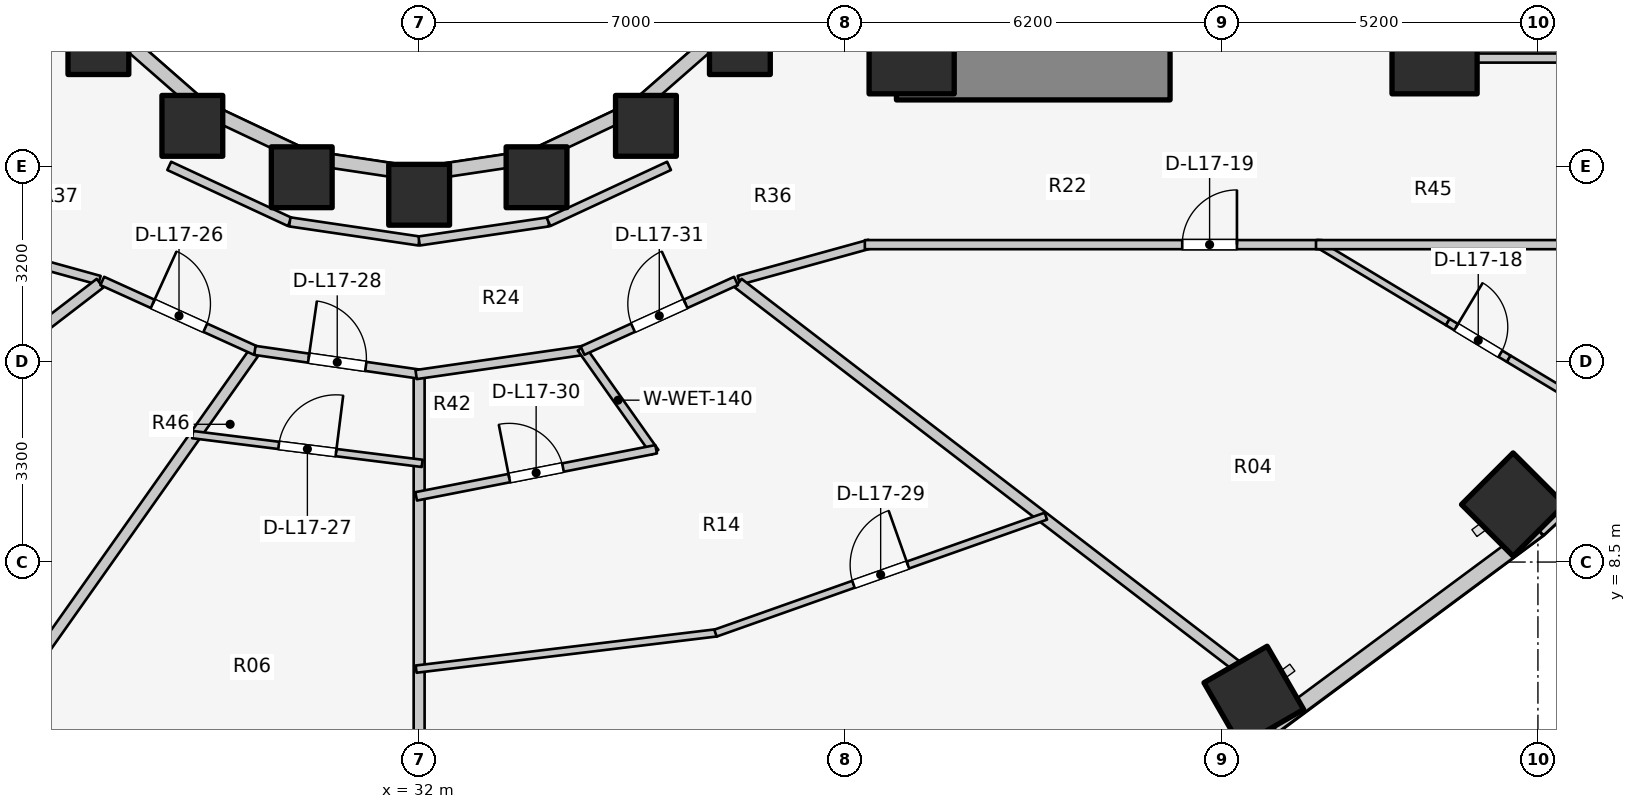
"""IFC4 building model, lengths in metres.
Left out: names, types, materials, properties, quantities, classifications, styles, units other than length and angle.
Written with IfcOpenShell. Run it as: python <this file> out.ifc"""

import sys

from ifc_helpers import new_model, si_unit, direction, frame, frame_2d, origin, origin_2d, place, context, subcontext, project, spatial, rectangle, extrude, element, fill, save


model = new_model("IFC4")
c1 = context("Model", 3, precision=1e-05, world=origin(), true_north=direction((0.0, 1.0)))
c2 = subcontext(c1, "Body", "Model", "MODEL_VIEW")
j1 = project(units=[si_unit("LENGTHUNIT", "METRE"), si_unit("PLANEANGLEUNIT", "RADIAN")], contexts=[c1])
p1 = place(None, origin())
s1 = spatial("IfcSite", under=j1, at=p1, CompositionType="ELEMENT")
p2 = place(p1, origin())
s2 = spatial("IfcBuilding", under=s1, at=p2, CompositionType="ELEMENT")
p3 = place(p2, frame((0.0, 0.0, 58.6)))
s3 = spatial("IfcBuildingStorey", under=s2, at=p3, CompositionType="ELEMENT", Elevation=58.6)
p4 = place(p3, frame((39.85, 16.55, 0.0), z_axis=(0.0, 0.0, 1.0), x_axis=(1.0, 0.0, 0.0)))
e1 = element("IfcWall", 1, at=p4, inside=s3, PredefinedType="SHEAR", context=c2, shape_type="SweptSolid", body=[
    extrude(rectangle(XDim=4.5, YDim=0.9, at=frame_2d((2.25, 0.0))), origin(), (0.0, 0.0, 1.0), 3.1),
])
for number, where, z_axis, x_axis in (
    (2, (40.1, 16.9, 0.0), (0.0, 0.0, 1.0), (1.0, 0.0, 0.0)),
    (3, (48.7, 16.9, 0.0), (0.0, 0.0, 1.0), (1.0, 0.0, 0.0)),
):
    element("IfcColumn", number, at=place(p3, frame(where, z_axis=z_axis, x_axis=x_axis)), inside=s3, PredefinedType="COLUMN", context=c2, shape_type="SweptSolid", body=[
        extrude(rectangle(XDim=1.4, YDim=1.4, at=origin_2d()), origin(), (0.0, 0.0, 1.0), 3.1),
    ])
for number, where, z_axis, x_axis in (
    (4, (26.725, 17.018, 0.0), (0.0, 0.0, 1.0), (1.0, 0.0, 0.0)),
    (5, (28.27, 15.673, 0.0), (0.0, 0.0, 1.0), (1.0, 0.0, 0.0)),
    (6, (30.069, 14.828, 0.0), (0.0, 0.0, 1.0), (1.0, 0.0, 0.0)),
    (7, (32.0, 14.54, 0.0), (0.0, 0.0, 1.0), (1.0, 0.0, 0.0)),
    (8, (33.931, 14.828, 0.0), (0.0, 0.0, 1.0), (1.0, 0.0, 0.0)),
    (9, (35.73, 15.673, 0.0), (0.0, 0.0, 1.0), (1.0, 0.0, 0.0)),
):
    element("IfcColumn", number, at=place(p3, frame(where, z_axis=z_axis, x_axis=x_axis)), inside=s3, PredefinedType="COLUMN", context=c2, shape_type="SweptSolid", body=[
        extrude(rectangle(XDim=1.0, YDim=1.0, at=origin_2d()), origin(), (0.0, 0.0, 1.0), 3.1),
    ])
p5 = place(p3, frame((45.727, 6.296, 0.0), z_axis=(0.0, 0.0, 1.0), x_axis=(0.5, -0.866025403784, 0.0)))
e10 = element("IfcColumn", 10, at=p5, inside=s3, PredefinedType="COLUMN", context=c2, shape_type="SweptSolid", body=[
    extrude(rectangle(XDim=1.2, YDim=1.2, at=origin_2d()), origin(), (0.0, 0.0, 1.0), 3.1),
])
p6 = place(p3, frame((37.275, 17.018, 0.0), z_axis=(0.0, 0.0, 1.0), x_axis=(1.0, 0.0, 0.0)))
e11 = element("IfcColumn", 11, at=p6, inside=s3, PredefinedType="COLUMN", context=c2, shape_type="SweptSolid", body=[
    extrude(rectangle(XDim=1.0, YDim=1.0, at=origin_2d()), origin(), (0.0, 0.0, 1.0), 3.1),
])
p7 = place(p3, frame((49.992, 9.446, 0.0), z_axis=(0.0, 0.0, 1.0), x_axis=(0.707106781187, -0.707106781187, 0.0)))
e12 = element("IfcColumn", 12, at=p7, inside=s3, PredefinedType="COLUMN", context=c2, shape_type="SweptSolid", body=[
    extrude(rectangle(XDim=1.2, YDim=1.2, at=origin_2d()), origin(), (0.0, 0.0, 1.0), 3.1),
])
p8 = place(p3, frame((26.965, 17.258, 0.0), z_axis=(0.0, 0.0, 1.0), x_axis=(0.752576694707, -0.658504607869, 0.0)))
e13 = element("IfcWall", 13, at=p8, inside=s3, PredefinedType="STANDARD", context=c2, shape_type="SweptSolid", body=[
    extrude(rectangle(XDim=1.959, YDim=0.23, at=frame_2d((0.98, 0.0))), origin(), (0.0, 0.0, 1.0), 2.16),
])
p9 = place(p3, frame((28.44, 15.968, 0.0), z_axis=(0.0, 0.0, 1.0), x_axis=(0.904179699603, -0.427152280606, 0.0)))
e14 = element("IfcWall", 14, at=p9, inside=s3, PredefinedType="STANDARD", context=c2, shape_type="SweptSolid", body=[
    extrude(rectangle(XDim=1.899, YDim=0.23, at=frame_2d((0.95, 0.0))), origin(), (0.0, 0.0, 1.0), 2.16),
])
for number, where, z_axis, x_axis in (
    (15, (30.157, 15.157, 0.0), (0.0, 0.0, 1.0), (0.989, -0.149, 0.0)),
    (16, (32.0, 14.88, 0.0), (0.0, 0.0, 1.0), (0.989, 0.149, 0.0)),
):
    element("IfcWall", number, at=place(p3, frame(where, z_axis=z_axis, x_axis=x_axis)), inside=s3, PredefinedType="STANDARD", context=c2, shape_type="SweptSolid", body=[
        extrude(rectangle(XDim=1.864, YDim=0.23, at=frame_2d((0.932, 0.0))), origin(), (0.0, 0.0, 1.0), 2.16),
    ])
p10 = place(p3, frame((33.843, 15.157, 0.0), z_axis=(0.0, 0.0, 1.0), x_axis=(0.904179699603, 0.427152280606, 0.0)))
e17 = element("IfcWall", 17, at=p10, inside=s3, PredefinedType="STANDARD", context=c2, shape_type="SweptSolid", body=[
    extrude(rectangle(XDim=1.899, YDim=0.23, at=frame_2d((0.95, 0.0))), origin(), (0.0, 0.0, 1.0), 2.16),
])
p11 = place(p3, frame((35.56, 15.968, 0.0), z_axis=(0.0, 0.0, 1.0), x_axis=(0.752576694707, 0.658504607869, 0.0)))
e18 = element("IfcWall", 18, at=p11, inside=s3, PredefinedType="STANDARD", context=c2, shape_type="SweptSolid", body=[
    extrude(rectangle(XDim=1.959, YDim=0.23, at=frame_2d((0.98, 0.0))), origin(), (0.0, 0.0, 1.0), 2.16),
])
p12 = place(p3, frame((40.332, 3.364, 0.0), z_axis=(0.0, 0.0, 1.0), x_axis=(0.919612132394, 0.39282760335, 0.0)))
e19 = element("IfcWall", 19, at=p12, inside=s3, PredefinedType="STANDARD", context=c2, shape_type="SweptSolid", body=[
    extrude(rectangle(XDim=6.209, YDim=0.26, at=frame_2d((3.105, 0.0))), origin(), (0.0, 0.0, 1.0), 2.85),
])
p13 = place(p12, frame((1.905, 0.0, 0.75)))
e20 = element("IfcOpeningElement", 20, at=p13, cuts=e19, PredefinedType="OPENING", context=c2, shape_type="SweptSolid", body=[
    extrude(rectangle(XDim=2.4, YDim=1.7, at=frame_2d((1.2, 0.85))), frame((0.0, 0.14, 0.0), z_axis=(0.0, -1.0, 0.0), x_axis=(1.0, 0.0, 0.0)), (0.0, 0.0, 1.0), 0.28),
])
p14 = place(p3, frame((46.042, 5.803, 0.0), z_axis=(0.0, 0.0, 1.0), x_axis=(0.803477531792, 0.595335078679, 0.0)))
e21 = element("IfcWall", 21, at=p14, inside=s3, PredefinedType="STANDARD", context=c2, shape_type="SweptSolid", body=[
    extrude(rectangle(XDim=5.43, YDim=0.26, at=frame_2d((2.715, 0.0))), origin(), (0.0, 0.0, 1.0), 2.85),
])
p15 = place(p3, frame((50.405, 9.035, 0.0), z_axis=(0.0, 0.0, 1.0), x_axis=(0.735655109293, 0.67735630223, 0.0)))
e22 = element("IfcWall", 22, at=p15, inside=s3, PredefinedType="STANDARD", context=c2, shape_type="SweptSolid", body=[
    extrude(rectangle(XDim=5.151, YDim=0.26, at=frame_2d((2.575, 0.0))), origin(), (0.0, 0.0, 1.0), 2.85),
])
p16 = place(p15, frame((3.074, 0.0, 0.75)))
e23 = element("IfcOpeningElement", 23, at=p16, cuts=e22, PredefinedType="OPENING", context=c2, shape_type="SweptSolid", body=[
    extrude(rectangle(XDim=1.2, YDim=1.5, at=frame_2d((0.6, 0.75))), frame((0.0, 0.14, 0.0), z_axis=(0.0, -1.0, 0.0), x_axis=(1.0, 0.0, 0.0)), (0.0, 0.0, 1.0), 0.28),
])
p17 = place(p3, frame((27.89, 15.015, 0.0), z_axis=(0.0, 0.0, 1.0), x_axis=(0.906943449489, -0.421252393975, 0.0)))
e24 = element("IfcWall", 24, at=p17, inside=s3, PredefinedType="PARTITIONING", context=c2, shape_type="SweptSolid", body=[
    extrude(rectangle(XDim=2.186, YDim=0.15, at=frame_2d((1.093, 0.0))), origin(), (0.0, 0.0, 1.0), 2.237),
])
for number, where, z_axis, x_axis in (
    (25, (29.873, 14.094, 0.0), (0.0, 0.0, 1.0), (0.989, -0.146, 0.0)),
    (26, (32.0, 13.78, 0.0), (0.0, 0.0, 1.0), (0.989, 0.146, 0.0)),
):
    element("IfcWall", number, at=place(p3, frame(where, z_axis=z_axis, x_axis=x_axis)), inside=s3, PredefinedType="PARTITIONING", context=c2, shape_type="SweptSolid", body=[
        extrude(rectangle(XDim=2.151, YDim=0.15, at=frame_2d((1.075, 0.0))), origin(), (0.0, 0.0, 1.0), 2.237),
    ])
p18 = place(p3, frame((34.127, 14.094, 0.0), z_axis=(0.0, 0.0, 1.0), x_axis=(0.906943449489, 0.421252393975, 0.0)))
e27 = element("IfcWall", 27, at=p18, inside=s3, PredefinedType="PARTITIONING", context=c2, shape_type="SweptSolid", body=[
    extrude(rectangle(XDim=2.186, YDim=0.15, at=frame_2d((1.093, 0.0))), origin(), (0.0, 0.0, 1.0), 2.237),
])
p19 = place(p3, frame((48.95, 16.788, 0.0), z_axis=(0.0, 0.0, 1.0), x_axis=(1.0, 0.0, 0.0)))
e28 = element("IfcWall", 28, at=p19, inside=s3, PredefinedType="PARTITIONING", context=c2, shape_type="SweptSolid", body=[
    extrude(rectangle(XDim=2.793, YDim=0.15, at=frame_2d((1.396, 0.0))), origin(), (0.0, 0.0, 1.0), 2.069),
])
p20 = place(p3, frame((26.742, 13.133, 0.0), z_axis=(0.0, 0.0, 1.0), x_axis=(-0.963833843713, 0.266503886865, 0.0)))
e29 = element("IfcWall", 29, at=p20, inside=s3, PredefinedType="PARTITIONING", context=c2, shape_type="SweptSolid", body=[
    extrude(rectangle(XDim=2.232, YDim=0.15, at=frame_2d((1.116, 0.0))), origin(), (0.0, 0.0, 1.0), 2.237),
])
p21 = place(p3, frame((46.757, 13.746, 0.0), z_axis=(0.0, 0.0, 1.0), x_axis=(0.856885623316, -0.515506574696, 0.0)))
e30 = element("IfcWall", 30, at=p21, inside=s3, PredefinedType="MOVABLE", context=c2, shape_type="SweptSolid", body=[
    extrude(rectangle(XDim=2.521, YDim=0.12, at=frame_2d((1.26, 0.0))), origin(), (0.0, 0.0, 1.0), 2.855),
])
p22 = place(p3, frame((48.917, 12.446, 0.0), z_axis=(0.0, 0.0, 1.0), x_axis=(0.856958544896, -0.515385343534, 0.0)))
e31 = element("IfcWall", 31, at=p22, inside=s3, PredefinedType="MOVABLE", context=c2, shape_type="SweptSolid", body=[
    extrude(rectangle(XDim=1.17, YDim=0.12, at=frame_2d((0.585, 0.0))), origin(), (0.0, 0.0, 1.0), 2.11),
])
p23 = place(p22, frame((0.16, 0.0, 0.0)))
e32 = element("IfcOpeningElement", 32, at=p23, cuts=e31, PredefinedType="OPENING", context=c2, shape_type="SweptSolid", body=[
    extrude(rectangle(XDim=0.85, YDim=2.05, at=frame_2d((0.425, 1.025))), frame((0.0, 0.07, 0.0), z_axis=(0.0, -1.0, 0.0), x_axis=(1.0, 0.0, 0.0)), (0.0, 0.0, 1.0), 0.14),
])
p24 = place(p3, frame((49.92, 11.843, 0.0), z_axis=(0.0, 0.0, 1.0), x_axis=(0.856902668222, -0.515478241243, 0.0)))
e33 = element("IfcWall", 33, at=p24, inside=s3, PredefinedType="MOVABLE", context=c2, shape_type="SweptSolid", body=[
    extrude(rectangle(XDim=2.521, YDim=0.12, at=frame_2d((1.26, 0.0))), origin(), (0.0, 0.0, 1.0), 2.855),
])
p25 = place(p3, frame((37.258, 13.133, 0.0), z_axis=(0.0, 0.0, 1.0), x_axis=(0.963833843713, 0.266503886865, 0.0)))
e34 = element("IfcWall", 34, at=p25, inside=s3, PredefinedType="PARTITIONING", context=c2, shape_type="SweptSolid", body=[
    extrude(rectangle(XDim=2.232, YDim=0.15, at=frame_2d((1.116, 0.0))), origin(), (0.0, 0.0, 1.0), 2.237),
])
p26 = place(p3, frame((39.33, 13.72, 0.0), z_axis=(0.0, 0.0, 1.0), x_axis=(1.0, 0.0, 0.0)))
e35 = element("IfcWall", 35, at=p26, inside=s3, PredefinedType="PARTITIONING", context=c2, shape_type="SweptSolid", body=[
    extrude(rectangle(XDim=7.52, YDim=0.15, at=frame_2d((3.76, 0.0))), origin(), (0.0, 0.0, 1.0), 2.237),
])
p27 = place(p26, frame((5.22, 0.0, 0.0)))
e36 = element("IfcOpeningElement", 36, at=p27, cuts=e35, PredefinedType="OPENING", context=c2, shape_type="SweptSolid", body=[
    extrude(rectangle(XDim=0.9, YDim=2.1, at=frame_2d((0.45, 1.05))), frame((0.0, 0.085, 0.0), z_axis=(0.0, -1.0, 0.0), x_axis=(1.0, 0.0, 0.0)), (0.0, 0.0, 1.0), 0.17),
])
p28 = place(p3, frame((46.75, 13.72, 0.0), z_axis=(0.0, 0.0, 1.0), x_axis=(1.0, 0.0, 0.0)))
e37 = element("IfcWall", 37, at=p28, inside=s3, PredefinedType="PARTITIONING", context=c2, shape_type="SweptSolid", body=[
    extrude(rectangle(XDim=5.05, YDim=0.15, at=frame_2d((2.525, 0.0))), origin(), (0.0, 0.0, 1.0), 2.069),
])
p29 = place(p3, frame((26.751, 13.085, 0.0), z_axis=(0.0, 0.0, 1.0), x_axis=(-0.793181014702, -0.608985942298, 0.0)))
e38 = element("IfcWall", 38, at=p29, inside=s3, PredefinedType="PARTITIONING", context=c2, shape_type="SweptSolid", body=[
    extrude(rectangle(XDim=10.324, YDim=0.18, at=frame_2d((5.162, 0.0))), origin(), (0.0, 0.0, 1.0), 2.237),
])
p30 = place(p3, frame((29.274, 11.934, 0.0), z_axis=(0.0, 0.0, 1.0), x_axis=(-0.577036915124, -0.816718065543, 0.0)))
e39 = element("IfcWall", 39, at=p30, inside=s3, PredefinedType="PARTITIONING", context=c2, shape_type="SweptSolid", body=[
    extrude(rectangle(XDim=9.131, YDim=0.18, at=frame_2d((4.565, 0.0))), origin(), (0.0, 0.0, 1.0), 2.237),
])
p31 = place(p3, frame((32.0, 11.535, 0.0), z_axis=(0.0, 0.0, 1.0), x_axis=(0.0, -1.0, 0.0)))
e40 = element("IfcWall", 40, at=p31, inside=s3, PredefinedType="PARTITIONING", context=c2, shape_type="SweptSolid", body=[
    extrude(rectangle(XDim=7.835, YDim=0.18, at=frame_2d((3.917, 0.0))), origin(), (0.0, 0.0, 1.0), 2.237),
])
p32 = place(p3, frame((37.249, 13.085, 0.0), z_axis=(0.0, 0.0, 1.0), x_axis=(0.793181014702, -0.608985942298, 0.0)))
e41 = element("IfcWall", 41, at=p32, inside=s3, PredefinedType="PARTITIONING", context=c2, shape_type="SweptSolid", body=[
    extrude(rectangle(XDim=10.324, YDim=0.18, at=frame_2d((5.162, 0.0))), origin(), (0.0, 0.0, 1.0), 2.237),
])
p33 = place(p3, frame((26.789, 13.123, 0.0), z_axis=(0.0, 0.0, 1.0), x_axis=(0.910568469686, -0.41335827319, 0.0)))
e42 = element("IfcWall", 42, at=p33, inside=s3, PredefinedType="PARTITIONING", context=c2, shape_type="SweptSolid", body=[
    extrude(rectangle(XDim=2.772, YDim=0.15, at=frame_2d((1.386, 0.0))), origin(), (0.0, 0.0, 1.0), 2.237),
])
p34 = place(p33, frame((0.911, 0.0, 0.0)))
e43 = element("IfcOpeningElement", 43, at=p34, cuts=e42, PredefinedType="OPENING", context=c2, shape_type="SweptSolid", body=[
    extrude(rectangle(XDim=0.95, YDim=2.1, at=frame_2d((0.475, 1.05))), frame((0.0, 0.085, 0.0), z_axis=(0.0, -1.0, 0.0), x_axis=(1.0, 0.0, 0.0)), (0.0, 0.0, 1.0), 0.17),
])
p35 = place(p3, frame((28.274, 10.596, 0.0), z_axis=(0.0, 0.0, 1.0), x_axis=(0.992245264378, -0.124295355177, 0.0)))
e44 = element("IfcWall", 44, at=p35, inside=s3, PredefinedType="MOVABLE", context=c2, shape_type="SweptSolid", body=[
    extrude(rectangle(XDim=3.805, YDim=0.12, at=frame_2d((1.902, 0.0))), origin(), (0.0, 0.0, 1.0), 2.237),
])
p36 = place(p35, frame((1.427, 0.0, 0.0)))
e45 = element("IfcOpeningElement", 45, at=p36, cuts=e44, PredefinedType="OPENING", context=c2, shape_type="SweptSolid", body=[
    extrude(rectangle(XDim=0.95, YDim=2.1, at=frame_2d((0.475, 1.05))), frame((0.0, 0.07, 0.0), z_axis=(0.0, -1.0, 0.0), x_axis=(1.0, 0.0, 0.0)), (0.0, 0.0, 1.0), 0.14),
])
p37 = place(p3, frame((29.299, 11.981, 0.0), z_axis=(0.0, 0.0, 1.0), x_axis=(0.989748682384, -0.142819976611, 0.0)))
e46 = element("IfcWall", 46, at=p37, inside=s3, PredefinedType="PARTITIONING", context=c2, shape_type="SweptSolid", body=[
    extrude(rectangle(XDim=2.737, YDim=0.15, at=frame_2d((1.368, 0.0))), origin(), (0.0, 0.0, 1.0), 2.237),
])
p38 = place(p37, frame((0.893, 0.0, 0.0)))
e47 = element("IfcOpeningElement", 47, at=p38, cuts=e46, PredefinedType="OPENING", context=c2, shape_type="SweptSolid", body=[
    extrude(rectangle(XDim=0.95, YDim=2.1, at=frame_2d((0.475, 1.05))), frame((0.0, 0.085, 0.0), z_axis=(0.0, -1.0, 0.0), x_axis=(1.0, 0.0, 0.0)), (0.0, 0.0, 1.0), 0.17),
])
p39 = place(p3, frame((31.95, 6.739, 0.0), z_axis=(0.0, 0.0, 1.0), x_axis=(0.992797021108, 0.11980849252, 0.0)))
e48 = element("IfcWall", 48, at=p39, inside=s3, PredefinedType="MOVABLE", context=c2, shape_type="SweptSolid", body=[
    extrude(rectangle(XDim=4.978, YDim=0.12, at=frame_2d((2.489, 0.0))), origin(), (0.0, 0.0, 1.0), 2.237),
])
p40 = place(p3, frame((36.874, 7.331, 0.0), z_axis=(0.0, 0.0, 1.0), x_axis=(0.942698294357, 0.333646408368, 0.0)))
e49 = element("IfcWall", 49, at=p40, inside=s3, PredefinedType="MOVABLE", context=c2, shape_type="SweptSolid", body=[
    extrude(rectangle(XDim=5.764, YDim=0.12, at=frame_2d((2.882, 0.0))), origin(), (0.0, 0.0, 1.0), 2.237),
])
p41 = place(p40, frame((2.407, 0.0, 0.0)))
e50 = element("IfcOpeningElement", 50, at=p41, cuts=e49, PredefinedType="OPENING", context=c2, shape_type="SweptSolid", body=[
    extrude(rectangle(XDim=0.95, YDim=2.1, at=frame_2d((0.475, 1.05))), frame((0.0, 0.07, 0.0), z_axis=(0.0, -1.0, 0.0), x_axis=(1.0, 0.0, 0.0)), (0.0, 0.0, 1.0), 0.14),
])
p42 = place(p3, frame((31.95, 11.583, 0.0), z_axis=(0.0, 0.0, 1.0), x_axis=(0.989761784218, 0.142729150844, 0.0)))
e51 = element("IfcWall", 51, at=p42, inside=s3, PredefinedType="PARTITIONING", context=c2, shape_type="SweptSolid", body=[
    extrude(rectangle(XDim=2.822, YDim=0.15, at=frame_2d((1.411, 0.0))), origin(), (0.0, 0.0, 1.0), 2.237),
])
p43 = place(p3, frame((34.665, 12.02, 0.0), z_axis=(0.0, 0.0, 1.0), x_axis=(0.577139575342, -0.816645523207, 0.0)))
e52 = element("IfcWall", 52, at=p43, inside=s3, PredefinedType="PLUMBINGWALL", context=c2, shape_type="SweptSolid", body=[
    extrude(rectangle(XDim=2.1, YDim=0.14, at=frame_2d((1.05, 0.0))), origin(), (0.0, 0.0, 1.0), 2.855),
])
p44 = place(p3, frame((31.951, 9.58, 0.0), z_axis=(0.0, 0.0, 1.0), x_axis=(0.981274848728, 0.19261274946, 0.0)))
e53 = element("IfcWall", 53, at=p44, inside=s3, PredefinedType="PLUMBINGWALL", context=c2, shape_type="SweptSolid", body=[
    extrude(rectangle(XDim=4.022, YDim=0.14, at=frame_2d((2.011, 0.0))), origin(), (0.0, 0.0, 1.0), 2.237),
])
p45 = place(p44, frame((1.561, 0.0, 0.0)))
e54 = element("IfcOpeningElement", 54, at=p45, cuts=e53, PredefinedType="OPENING", context=c2, shape_type="SweptSolid", body=[
    extrude(rectangle(XDim=0.9, YDim=2.1, at=frame_2d((0.45, 1.05))), frame((0.0, 0.08, 0.0), z_axis=(0.0, -1.0, 0.0), x_axis=(1.0, 0.0, 0.0)), (0.0, 0.0, 1.0), 0.16),
])
p46 = place(p3, frame((34.687, 11.977, 0.0), z_axis=(0.0, 0.0, 1.0), x_axis=(0.910568469686, 0.41335827319, 0.0)))
e55 = element("IfcWall", 55, at=p46, inside=s3, PredefinedType="PARTITIONING", context=c2, shape_type="SweptSolid", body=[
    extrude(rectangle(XDim=2.772, YDim=0.15, at=frame_2d((1.386, 0.0))), origin(), (0.0, 0.0, 1.0), 2.237),
])
p47 = place(p46, frame((0.911, 0.0, 0.0)))
e56 = element("IfcOpeningElement", 56, at=p47, cuts=e55, PredefinedType="OPENING", context=c2, shape_type="SweptSolid", body=[
    extrude(rectangle(XDim=0.95, YDim=2.1, at=frame_2d((0.475, 1.05))), frame((0.0, 0.085, 0.0), z_axis=(0.0, -1.0, 0.0), x_axis=(1.0, 0.0, 0.0)), (0.0, 0.0, 1.0), 0.17),
])
p48 = place(p23, origin())
e57 = element("IfcDoor", 57, at=p48, inside=s3, OperationType="SINGLE_SWING_LEFT", PredefinedType="DOOR", context=c2, shape_type="SweptSolid", body=[
    extrude(rectangle(XDim=0.85, YDim=2.05, at=frame_2d((0.425, 1.025))), frame((0.0, 0.025, 0.0), z_axis=(0.0, -1.0, 0.0), x_axis=(1.0, 0.0, 0.0)), (0.0, 0.0, 1.0), 0.05),
])
fill(e32, e57)
p49 = place(p27, origin())
e58 = element("IfcDoor", 58, at=p49, inside=s3, OperationType="SINGLE_SWING_RIGHT", PredefinedType="DOOR", context=c2, shape_type="SweptSolid", body=[
    extrude(rectangle(XDim=0.9, YDim=2.1, at=frame_2d((0.45, 1.05))), frame((0.0, 0.025, 0.0), z_axis=(0.0, -1.0, 0.0), x_axis=(1.0, 0.0, 0.0)), (0.0, 0.0, 1.0), 0.05),
])
fill(e36, e58)
p50 = place(p34, origin())
e59 = element("IfcDoor", 59, at=p50, inside=s3, OperationType="SINGLE_SWING_LEFT", PredefinedType="DOOR", context=c2, shape_type="SweptSolid", body=[
    extrude(rectangle(XDim=0.95, YDim=2.1, at=frame_2d((0.475, 1.05))), frame((0.0, 0.025, 0.0), z_axis=(0.0, -1.0, 0.0), x_axis=(1.0, 0.0, 0.0)), (0.0, 0.0, 1.0), 0.05),
])
fill(e43, e59)
p51 = place(p36, origin())
e60 = element("IfcDoor", 60, at=p51, inside=s3, OperationType="SINGLE_SWING_RIGHT", PredefinedType="DOOR", context=c2, shape_type="SweptSolid", body=[
    extrude(rectangle(XDim=0.95, YDim=2.1, at=frame_2d((0.475, 1.05))), frame((0.0, 0.025, 0.0), z_axis=(0.0, -1.0, 0.0), x_axis=(1.0, 0.0, 0.0)), (0.0, 0.0, 1.0), 0.05),
])
fill(e45, e60)
p52 = place(p38, origin())
e61 = element("IfcDoor", 61, at=p52, inside=s3, OperationType="SINGLE_SWING_LEFT", PredefinedType="DOOR", context=c2, shape_type="SweptSolid", body=[
    extrude(rectangle(XDim=0.95, YDim=2.1, at=frame_2d((0.475, 1.05))), frame((0.0, 0.025, 0.0), z_axis=(0.0, -1.0, 0.0), x_axis=(1.0, 0.0, 0.0)), (0.0, 0.0, 1.0), 0.05),
])
fill(e47, e61)
p53 = place(p41, origin())
e62 = element("IfcDoor", 62, at=p53, inside=s3, OperationType="SINGLE_SWING_RIGHT", PredefinedType="DOOR", context=c2, shape_type="SweptSolid", body=[
    extrude(rectangle(XDim=0.95, YDim=2.1, at=frame_2d((0.475, 1.05))), frame((0.0, 0.025, 0.0), z_axis=(0.0, -1.0, 0.0), x_axis=(1.0, 0.0, 0.0)), (0.0, 0.0, 1.0), 0.05),
])
fill(e50, e62)
p54 = place(p45, origin())
e63 = element("IfcDoor", 63, at=p54, inside=s3, OperationType="SINGLE_SWING_LEFT", PredefinedType="DOOR", context=c2, shape_type="SweptSolid", body=[
    extrude(rectangle(XDim=0.9, YDim=2.1, at=frame_2d((0.45, 1.05))), frame((0.0, 0.025, 0.0), z_axis=(0.0, -1.0, 0.0), x_axis=(1.0, 0.0, 0.0)), (0.0, 0.0, 1.0), 0.05),
])
fill(e54, e63)
p55 = place(p47, origin())
e64 = element("IfcDoor", 64, at=p55, inside=s3, OperationType="SINGLE_SWING_RIGHT", PredefinedType="DOOR", context=c2, shape_type="SweptSolid", body=[
    extrude(rectangle(XDim=0.95, YDim=2.1, at=frame_2d((0.475, 1.05))), frame((0.0, 0.025, 0.0), z_axis=(0.0, -1.0, 0.0), x_axis=(1.0, 0.0, 0.0)), (0.0, 0.0, 1.0), 0.05),
])
fill(e56, e64)
save(model, sys.argv[1])
